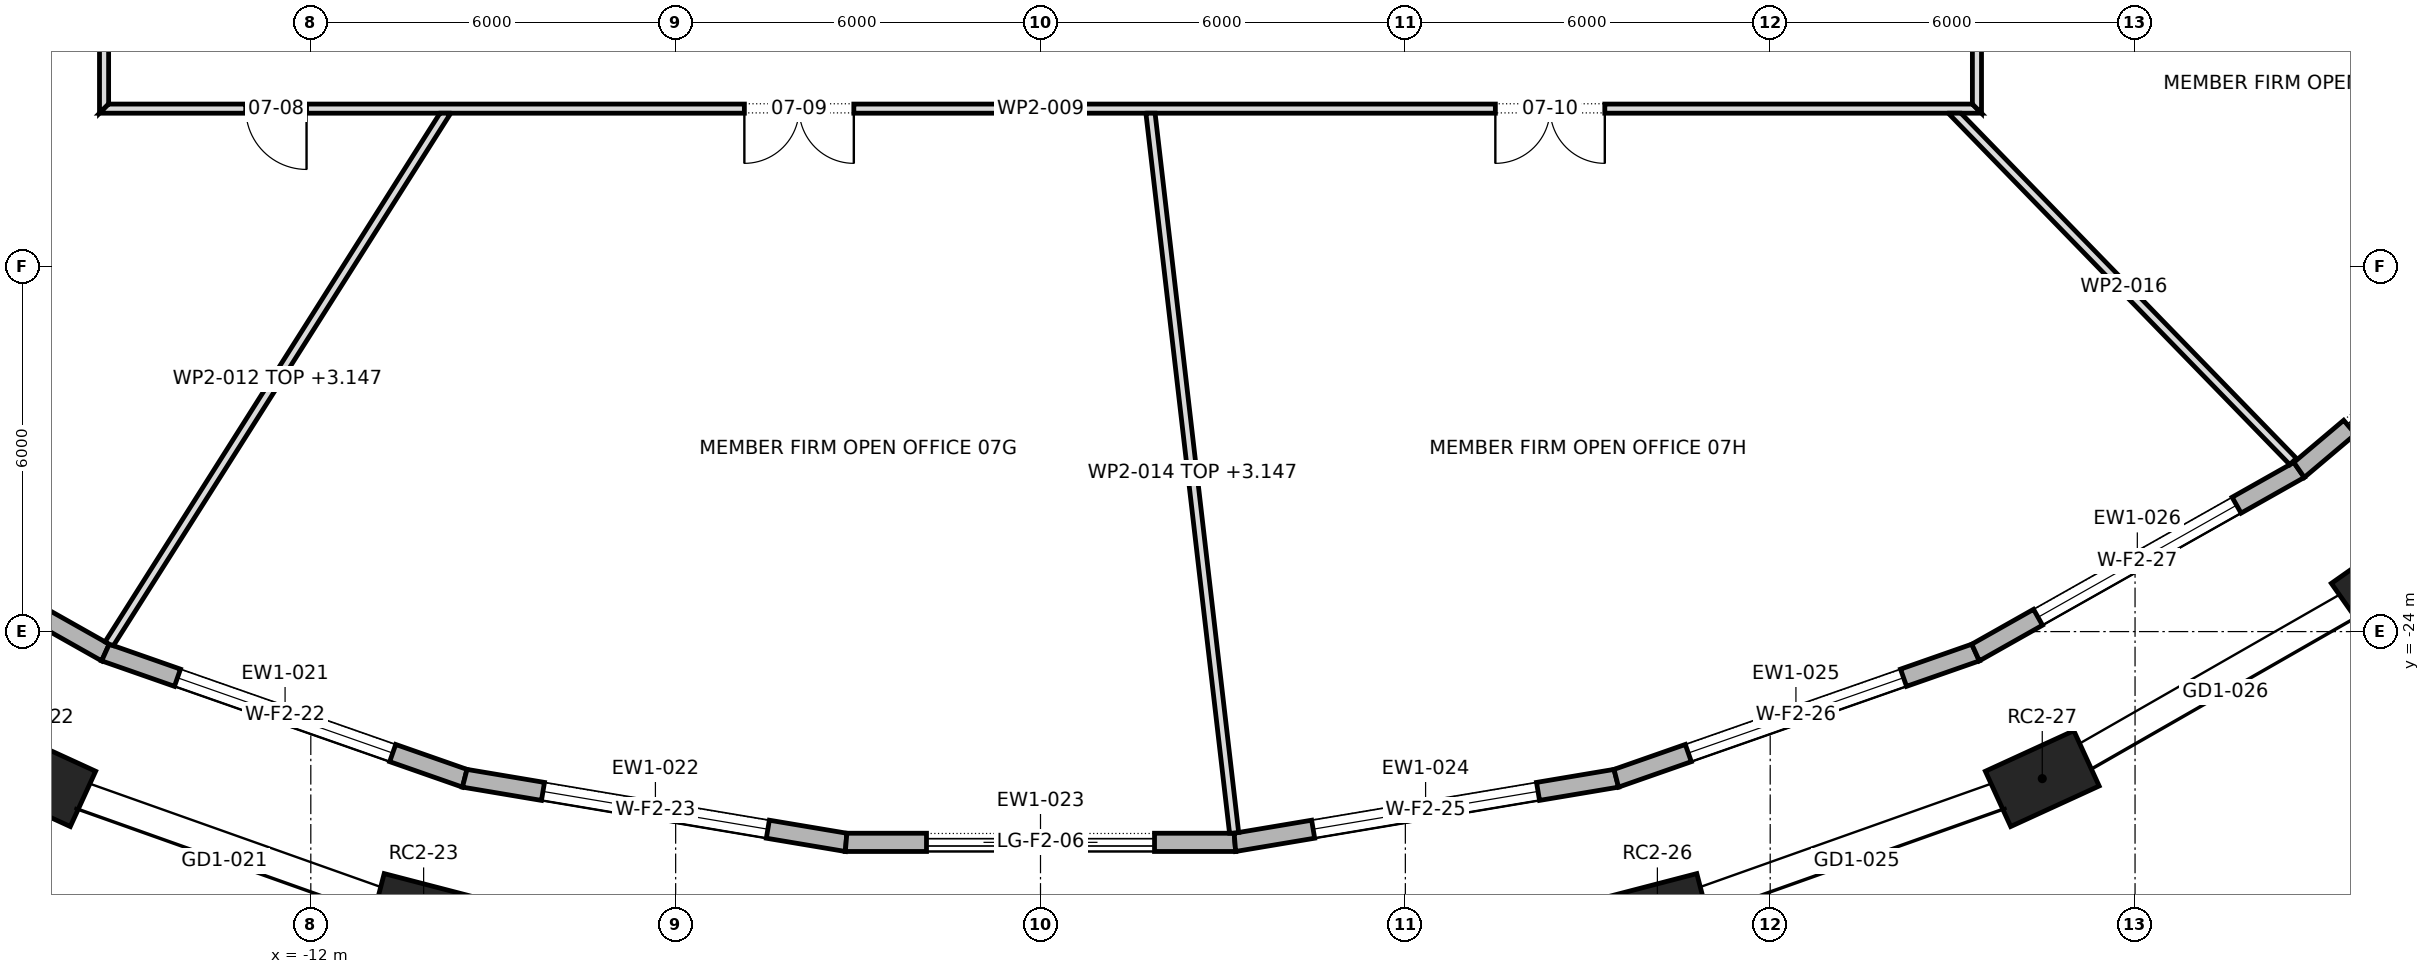
"""IFC4 building model, lengths in metres.
Left out: names, types, materials, properties, quantities, classifications, styles, units other than length and angle.
Written with IfcOpenShell. Run it as: python <this file> out.ifc"""

import sys

from ifc_helpers import new_model, si_unit, direction, frame, frame_2d, origin, origin_2d, place, context, subcontext, project, spatial, polyline, rectangle, outline, extrude, element, fill, save


model = new_model("IFC4")
c1 = context("Model", 3, precision=1e-05, world=origin(), true_north=direction((0.0, 1.0)))
c2 = subcontext(c1, "Body", "Model", "MODEL_VIEW")
j1 = project(units=[si_unit("LENGTHUNIT", "METRE"), si_unit("PLANEANGLEUNIT", "RADIAN")], contexts=[c1])
p1 = place(None, origin())
s1 = spatial("IfcSite", under=j1, at=p1, CompositionType="ELEMENT")
p2 = place(p1, origin())
s2 = spatial("IfcBuilding", under=s1, at=p2, CompositionType="ELEMENT")
p3 = place(p2, frame((0.0, 0.0, 112.9)))
s3 = spatial("IfcBuildingStorey", under=s2, at=p3, CompositionType="ELEMENT", Elevation=112.9)
for number, where, z_axis, x_axis in (
    (1, (-16.474, -26.418, 0.0), (0.0, 0.0, 1.0), (0.909, -0.417, 0.0)),
    (2, (-10.145, -28.665, 0.0), (0.0, 0.0, 1.0), (0.968, -0.252, 0.0)),
    (3, (10.145, -28.665, 0.0), (0.0, 0.0, 1.0), (0.968, 0.252, 0.0)),
    (4, (16.474, -26.418, 0.0), (0.0, 0.0, 1.0), (0.909, 0.417, 0.0)),
    (5, (22.17, -23.156, 0.0), (0.0, 0.0, 1.0), (0.818, 0.575, 0.0)),
):
    element("IfcColumn", number, at=place(p3, frame(where, z_axis=z_axis, x_axis=x_axis)), inside=s3, PredefinedType="COLUMN", context=c2, shape_type="SweptSolid", body=[
        extrude(rectangle(XDim=1.6, YDim=1.0, at=origin_2d()), origin(), (0.0, 0.0, 1.0), 4.2),
    ])
p4 = place(p3, frame((-20.697, -21.341, 0.0), z_axis=(0.0, 0.0, 1.0), x_axis=(0.870828448417, -0.491587035455, 0.0)))
e6 = element("IfcWall", 6, at=p4, inside=s3, PredefinedType="STANDARD", context=c2, shape_type="SweptSolid", body=[
    extrude(outline(polyline([(-0.014, -0.15), (6.122, -0.15), (6.095, 0.15), (0.014, 0.15), (-0.014, -0.15)])), origin(), (0.0, 0.0, 1.0), 3.9),
])
p5 = place(p4, frame((1.179, 0.0, 0.6)))
e7 = element("IfcOpeningElement", 7, at=p5, cuts=e6, PredefinedType="OPENING", context=c2, shape_type="SweptSolid", body=[
    extrude(rectangle(XDim=3.75, YDim=2.85, at=frame_2d((1.875, 1.425))), frame((0.0, 0.162, 0.0), z_axis=(0.0, -1.0, 0.0), x_axis=(1.0, 0.0, 0.0)), (0.0, 0.0, 1.0), 0.324),
])
p6 = place(p3, frame((-15.377, -24.344, 0.0), z_axis=(0.0, 0.0, 1.0), x_axis=(0.943866868202, -0.330326104193, 0.0)))
e8 = element("IfcWall", 8, at=p6, inside=s3, PredefinedType="STANDARD", context=c2, shape_type="SweptSolid", body=[
    extrude(outline(polyline([(-0.013, -0.15), (6.273, -0.15), (6.247, 0.15), (0.013, 0.15), (-0.013, -0.15)])), origin(), (0.0, 0.0, 1.0), 3.9),
])
p7 = place(p6, frame((1.255, 0.0, 0.6)))
e9 = element("IfcOpeningElement", 9, at=p7, cuts=e8, PredefinedType="OPENING", context=c2, shape_type="SweptSolid", body=[
    extrude(rectangle(XDim=3.75, YDim=2.85, at=frame_2d((1.875, 1.425))), frame((0.0, 0.162, 0.0), z_axis=(0.0, -1.0, 0.0), x_axis=(1.0, 0.0, 0.0)), (0.0, 0.0, 1.0), 0.324),
])
p8 = place(p3, frame((-9.469, -26.412, 0.0), z_axis=(0.0, 0.0, 1.0), x_axis=(0.986178310488, -0.165687476666, 0.0)))
e10 = element("IfcWall", 10, at=p8, inside=s3, PredefinedType="STANDARD", context=c2, shape_type="SweptSolid", body=[
    extrude(outline(polyline([(-0.013, -0.15), (6.372, -0.15), (6.347, 0.15), (0.013, 0.15), (-0.013, -0.15)])), origin(), (0.0, 0.0, 1.0), 3.9),
])
p9 = place(p8, frame((1.305, 0.0, 0.6)))
e11 = element("IfcOpeningElement", 11, at=p9, cuts=e10, PredefinedType="OPENING", context=c2, shape_type="SweptSolid", body=[
    extrude(rectangle(XDim=3.75, YDim=2.85, at=frame_2d((1.875, 1.425))), frame((0.0, 0.162, 0.0), z_axis=(0.0, -1.0, 0.0), x_axis=(1.0, 0.0, 0.0)), (0.0, 0.0, 1.0), 0.324),
])
p10 = place(p3, frame((-3.197, -27.466, 0.0), z_axis=(0.0, 0.0, 1.0), x_axis=(1.0, 0.0, 0.0)))
e12 = element("IfcWall", 12, at=p10, inside=s3, PredefinedType="STANDARD", context=c2, shape_type="SweptSolid", body=[
    extrude(outline(polyline([(-0.012, -0.15), (6.406, -0.15), (6.382, 0.15), (0.012, 0.15), (-0.012, -0.15)])), origin(), (0.0, 0.0, 1.0), 3.9),
])
p11 = place(p10, frame((1.322, 0.0, 0.0)))
e13 = element("IfcOpeningElement", 13, at=p11, cuts=e12, PredefinedType="OPENING", context=c2, shape_type="SweptSolid", body=[
    extrude(rectangle(XDim=3.75, YDim=3.45, at=frame_2d((1.875, 1.725))), frame((0.0, 0.162, 0.0), z_axis=(0.0, -1.0, 0.0), x_axis=(1.0, 0.0, 0.0)), (0.0, 0.0, 1.0), 0.324),
])
p12 = place(p3, frame((3.197, -27.466, 0.0), z_axis=(0.0, 0.0, 1.0), x_axis=(0.986178310488, 0.165687476666, 0.0)))
e14 = element("IfcWall", 14, at=p12, inside=s3, PredefinedType="STANDARD", context=c2, shape_type="SweptSolid", body=[
    extrude(outline(polyline([(-0.012, -0.15), (6.372, -0.15), (6.347, 0.15), (0.012, 0.15), (-0.012, -0.15)])), origin(), (0.0, 0.0, 1.0), 3.9),
])
p13 = place(p12, frame((1.305, 0.0, 0.6)))
e15 = element("IfcOpeningElement", 15, at=p13, cuts=e14, PredefinedType="OPENING", context=c2, shape_type="SweptSolid", body=[
    extrude(rectangle(XDim=3.75, YDim=2.85, at=frame_2d((1.875, 1.425))), frame((0.0, 0.162, 0.0), z_axis=(0.0, -1.0, 0.0), x_axis=(1.0, 0.0, 0.0)), (0.0, 0.0, 1.0), 0.324),
])
p14 = place(p3, frame((9.469, -26.412, 0.0), z_axis=(0.0, 0.0, 1.0), x_axis=(0.943866868202, 0.330326104193, 0.0)))
e16 = element("IfcWall", 16, at=p14, inside=s3, PredefinedType="STANDARD", context=c2, shape_type="SweptSolid", body=[
    extrude(outline(polyline([(-0.013, -0.15), (6.273, -0.15), (6.247, 0.15), (0.013, 0.15), (-0.013, -0.15)])), origin(), (0.0, 0.0, 1.0), 3.9),
])
p15 = place(p14, frame((1.255, 0.0, 0.6)))
e17 = element("IfcOpeningElement", 17, at=p15, cuts=e16, PredefinedType="OPENING", context=c2, shape_type="SweptSolid", body=[
    extrude(rectangle(XDim=3.75, YDim=2.85, at=frame_2d((1.875, 1.425))), frame((0.0, 0.162, 0.0), z_axis=(0.0, -1.0, 0.0), x_axis=(1.0, 0.0, 0.0)), (0.0, 0.0, 1.0), 0.324),
])
p16 = place(p3, frame((15.377, -24.344, 0.0), z_axis=(0.0, 0.0, 1.0), x_axis=(0.870828448417, 0.491587035455, 0.0)))
e18 = element("IfcWall", 18, at=p16, inside=s3, PredefinedType="STANDARD", context=c2, shape_type="SweptSolid", body=[
    extrude(outline(polyline([(-0.013, -0.15), (6.123, -0.15), (6.094, 0.15), (0.013, 0.15), (-0.013, -0.15)])), origin(), (0.0, 0.0, 1.0), 3.9),
])
p17 = place(p16, frame((1.179, 0.0, 0.6)))
e19 = element("IfcOpeningElement", 19, at=p17, cuts=e18, PredefinedType="OPENING", context=c2, shape_type="SweptSolid", body=[
    extrude(rectangle(XDim=3.75, YDim=2.85, at=frame_2d((1.875, 1.425))), frame((0.0, 0.162, 0.0), z_axis=(0.0, -1.0, 0.0), x_axis=(1.0, 0.0, 0.0)), (0.0, 0.0, 1.0), 0.324),
])
p18 = place(p3, frame((20.697, -21.341, 0.0), z_axis=(0.0, 0.0, 1.0), x_axis=(0.763894031266, 0.645341699409, 0.0)))
e20 = element("IfcWall", 20, at=p18, inside=s3, PredefinedType="STANDARD", context=c2, shape_type="SweptSolid", body=[
    extrude(outline(polyline([(-0.014, -0.15), (5.94, -0.15), (5.91, 0.15), (0.014, 0.15), (-0.014, -0.15)])), origin(), (0.0, 0.0, 1.0), 3.9),
])
p19 = place(p18, frame((1.087, 0.0, 0.0)))
e21 = element("IfcOpeningElement", 21, at=p19, cuts=e20, PredefinedType="OPENING", context=c2, shape_type="SweptSolid", body=[
    extrude(rectangle(XDim=3.75, YDim=3.45, at=frame_2d((1.875, 1.725))), frame((0.0, 0.162, 0.0), z_axis=(0.0, -1.0, 0.0), x_axis=(1.0, 0.0, 0.0)), (0.0, 0.0, 1.0), 0.324),
])
p20 = place(p3, frame((-25.12, -17.414, 0.0), z_axis=(0.0, 0.0, 1.0), x_axis=(0.822008683907, 0.569474954306, 0.0)))
e22 = element("IfcWall", 22, at=p20, inside=s3, PredefinedType="PARTITIONING", context=c2, shape_type="SweptSolid", body=[
    extrude(outline(polyline([(0.024, -0.075), (1.967, -0.075), (3.91, -0.075), (5.853, -0.075), (7.796, -0.075), (9.739, -0.075), (11.681, -0.075), (11.734, 0.002), (11.734, 0.002), (11.785, 0.074), (11.785, 0.075), (10.15, 0.075), (8.516, 0.075), (6.881, 0.075), (5.246, 0.075), (5.245, 0.072), (5.241, 0.075), (3.494, 0.075), (1.747, 0.075), (0.0, 0.075), (0.0, 0.07), (0.005, -0.002), (0.024, -0.075)])), origin(), (0.0, 0.0, 1.0), 3.147),
])
p21 = place(p3, frame((-15.4, -15.475, 0.0), z_axis=(0.0, 0.0, 1.0), x_axis=(0.0, 1.0, 0.0)))
e23 = element("IfcWall", 23, at=p21, inside=s3, PredefinedType="PARTITIONING", context=c2, shape_type="SweptSolid", body=[
    extrude(outline(polyline([(0.15, -0.075), (2.066, -0.075), (3.981, -0.075), (5.897, -0.075), (7.812, -0.075), (9.728, -0.075), (11.644, -0.075), (13.56, -0.075), (15.475, -0.075), (17.391, -0.075), (19.306, -0.075), (21.222, -0.075), (23.138, -0.075), (25.053, -0.075), (26.969, -0.075), (28.885, -0.075), (30.8, -0.075), (30.95, 0.075), (29.016, 0.075), (27.081, 0.075), (25.147, 0.075), (23.212, 0.075), (21.278, 0.075), (19.344, 0.075), (17.409, 0.075), (15.475, 0.075), (13.541, 0.075), (11.606, 0.075), (9.672, 0.075), (7.738, 0.075), (5.803, 0.075), (3.869, 0.075), (1.935, 0.075), (0.0, 0.075), (0.15, -0.075)])), origin(), (0.0, 0.0, 1.0), 3.9),
])
p22 = place(p21, frame((24.25, 0.0, 0.0)))
e24 = element("IfcOpeningElement", 24, at=p22, cuts=e23, PredefinedType="OPENING", context=c2, shape_type="SweptSolid", body=[
    extrude(rectangle(XDim=1.8, YDim=2.1, at=frame_2d((0.9, 1.05))), frame((0.0, 0.087, 0.0), z_axis=(0.0, -1.0, 0.0), x_axis=(1.0, 0.0, 0.0)), (0.0, 0.0, 1.0), 0.174),
])
p23 = place(p21, frame((6.735, 0.0, 0.0)))
e25 = element("IfcOpeningElement", 25, at=p23, cuts=e23, PredefinedType="OPENING", context=c2, shape_type="SweptSolid", body=[
    extrude(rectangle(XDim=1.0, YDim=2.1, at=frame_2d((0.5, 1.05))), frame((0.0, 0.087, 0.0), z_axis=(0.0, -1.0, 0.0), x_axis=(1.0, 0.0, 0.0)), (0.0, 0.0, 1.0), 0.174),
])
p24 = place(p21, frame((12.5, 0.0, 0.0)))
e26 = element("IfcOpeningElement", 26, at=p24, cuts=e23, PredefinedType="OPENING", context=c2, shape_type="SweptSolid", body=[
    extrude(rectangle(XDim=1.0, YDim=2.1, at=frame_2d((0.5, 1.05))), frame((0.0, 0.087, 0.0), z_axis=(0.0, -1.0, 0.0), x_axis=(1.0, 0.0, 0.0)), (0.0, 0.0, 1.0), 0.174),
])
p25 = place(p21, frame((17.375, 0.0, 0.0)))
e27 = element("IfcOpeningElement", 27, at=p25, cuts=e23, PredefinedType="OPENING", context=c2, shape_type="SweptSolid", body=[
    extrude(rectangle(XDim=1.0, YDim=2.1, at=frame_2d((0.5, 1.05))), frame((0.0, 0.087, 0.0), z_axis=(0.0, -1.0, 0.0), x_axis=(1.0, 0.0, 0.0)), (0.0, 0.0, 1.0), 0.174),
])
p26 = place(p3, frame((-15.475, -15.4, 0.0), z_axis=(0.0, 0.0, 1.0), x_axis=(1.0, 0.0, 0.0)))
e28 = element("IfcWall", 28, at=p26, inside=s3, PredefinedType="PARTITIONING", context=c2, shape_type="SweptSolid", body=[
    extrude(outline(polyline([(0.0, -0.075), (1.935, -0.075), (3.869, -0.075), (5.803, -0.075), (7.738, -0.075), (9.672, -0.075), (11.606, -0.075), (13.541, -0.075), (15.475, -0.075), (17.409, -0.075), (19.344, -0.075), (21.278, -0.075), (23.212, -0.075), (25.147, -0.075), (27.081, -0.075), (29.016, -0.075), (30.95, -0.075), (30.8, 0.075), (28.885, 0.075), (26.969, 0.075), (25.053, 0.075), (23.138, 0.075), (21.222, 0.075), (19.306, 0.075), (17.391, 0.075), (15.475, 0.075), (13.56, 0.075), (11.644, 0.075), (9.728, 0.075), (7.812, 0.075), (5.897, 0.075), (3.981, 0.075), (2.066, 0.075), (0.15, 0.075), (0.0, -0.075)])), origin(), (0.0, 0.0, 1.0), 3.9),
])
p27 = place(p26, frame((2.405, 0.0, 0.0)))
e29 = element("IfcOpeningElement", 29, at=p27, cuts=e28, PredefinedType="OPENING", context=c2, shape_type="SweptSolid", body=[
    extrude(rectangle(XDim=1.0, YDim=2.1, at=frame_2d((0.5, 1.05))), frame((0.0, 0.087, 0.0), z_axis=(0.0, -1.0, 0.0), x_axis=(1.0, 0.0, 0.0)), (0.0, 0.0, 1.0), 0.174),
])
p28 = place(p26, frame((10.605, 0.0, 0.0)))
e30 = element("IfcOpeningElement", 30, at=p28, cuts=e28, PredefinedType="OPENING", context=c2, shape_type="SweptSolid", body=[
    extrude(rectangle(XDim=1.8, YDim=2.1, at=frame_2d((0.9, 1.05))), frame((0.0, 0.087, 0.0), z_axis=(0.0, -1.0, 0.0), x_axis=(1.0, 0.0, 0.0)), (0.0, 0.0, 1.0), 0.174),
])
p29 = place(p26, frame((22.955, 0.0, 0.0)))
e31 = element("IfcOpeningElement", 31, at=p29, cuts=e28, PredefinedType="OPENING", context=c2, shape_type="SweptSolid", body=[
    extrude(rectangle(XDim=1.8, YDim=2.1, at=frame_2d((0.9, 1.05))), frame((0.0, 0.087, 0.0), z_axis=(0.0, -1.0, 0.0), x_axis=(1.0, 0.0, 0.0)), (0.0, 0.0, 1.0), 0.174),
])
p30 = place(p3, frame((-9.762, -15.435, 0.0), z_axis=(0.0, 0.0, 1.0), x_axis=(-0.535189090909, -0.844732287161, 0.0)))
e32 = element("IfcWall", 32, at=p30, inside=s3, PredefinedType="PARTITIONING", context=c2, shape_type="SweptSolid", body=[
    extrude(outline(polyline([(10.386, -0.075), (10.386, -0.069), (10.382, 0.004), (10.365, 0.075), (8.638, 0.075), (6.91, 0.075), (5.183, 0.075), (3.455, 0.075), (1.728, 0.075), (0.0, 0.075), (0.0, 0.075), (0.095, -0.075), (1.81, -0.075), (3.525, -0.075), (5.24, -0.075), (6.955, -0.075), (8.671, -0.075), (10.386, -0.075)])), origin(), (0.0, 0.0, 1.0), 3.147),
])
p31 = place(p3, frame((1.808, -15.467, 0.0), z_axis=(0.0, 0.0, 1.0), x_axis=(0.115425226741, -0.993316171736, 0.0)))
e33 = element("IfcWall", 33, at=p31, inside=s3, PredefinedType="PARTITIONING", context=c2, shape_type="SweptSolid", body=[
    extrude(outline(polyline([(0.0, -0.075), (1.987, -0.075), (3.973, -0.075), (5.96, -0.075), (7.947, -0.075), (9.934, -0.075), (11.92, -0.075), (11.925, -0.035), (11.925, 0.075), (9.94, 0.075), (7.956, 0.075), (5.971, 0.075), (3.987, 0.075), (2.002, 0.075), (0.017, 0.075), (0.0, -0.073), (0.0, -0.075)])), origin(), (0.0, 0.0, 1.0), 3.147),
])
p32 = place(p3, frame((14.982, -15.423, 0.0), z_axis=(0.0, 0.0, 1.0), x_axis=(0.696915710248, -0.717153046992, 0.0)))
e34 = element("IfcWall", 34, at=p32, inside=s3, PredefinedType="PARTITIONING", context=c2, shape_type="SweptSolid", body=[
    extrude(outline(polyline([(8.059, 0.075), (6.08, 0.075), (4.102, 0.075), (2.124, 0.075), (0.146, 0.075), (0.0, -0.075), (0.0, -0.075), (1.612, -0.075), (3.223, -0.075), (4.835, -0.075), (6.447, -0.075), (8.059, -0.075), (8.059, 0.075)])), origin(), (0.0, 0.0, 1.0), 3.9),
])
p33 = place(p3, frame((15.4, -15.475, 0.0), z_axis=(0.0, 0.0, 1.0), x_axis=(0.0, 1.0, 0.0)))
e35 = element("IfcWall", 35, at=p33, inside=s3, PredefinedType="PARTITIONING", context=c2, shape_type="SweptSolid", body=[
    extrude(outline(polyline([(14.195, 0.075), (12.439, 0.075), (10.684, 0.075), (8.928, 0.075), (7.173, 0.075), (5.417, 0.075), (3.661, 0.075), (1.906, 0.075), (0.15, 0.075), (0.0, -0.075), (1.775, -0.075), (3.549, -0.075), (5.323, -0.075), (7.098, -0.075), (8.872, -0.075), (10.646, -0.075), (12.421, -0.075), (14.195, -0.075), (14.195, 0.075)])), origin(), (0.0, 0.0, 1.0), 3.9),
])
p34 = place(p33, frame((3.8, 0.0, 0.0)))
e36 = element("IfcOpeningElement", 36, at=p34, cuts=e35, PredefinedType="OPENING", context=c2, shape_type="SweptSolid", body=[
    extrude(rectangle(XDim=1.0, YDim=2.1, at=frame_2d((0.5, 1.05))), frame((0.0, 0.087, 0.0), z_axis=(0.0, -1.0, 0.0), x_axis=(1.0, 0.0, 0.0)), (0.0, 0.0, 1.0), 0.174),
])
p35 = place(p33, frame((10.86, 0.0, 0.0)))
e37 = element("IfcOpeningElement", 37, at=p35, cuts=e35, PredefinedType="OPENING", context=c2, shape_type="SweptSolid", body=[
    extrude(rectangle(XDim=1.0, YDim=2.1, at=frame_2d((0.5, 1.05))), frame((0.0, 0.087, 0.0), z_axis=(0.0, -1.0, 0.0), x_axis=(1.0, 0.0, 0.0)), (0.0, 0.0, 1.0), 0.174),
])
p36 = place(p7, origin())
e38 = element("IfcWindow", 38, at=p36, inside=s3, PartitioningType="TRIPLE_PANEL_VERTICAL", PredefinedType="WINDOW", context=c2, shape_type="SweptSolid", body=[
    extrude(rectangle(XDim=3.75, YDim=2.85, at=frame_2d((1.875, 1.425))), frame((0.0, 0.03, 0.0), z_axis=(0.0, -1.0, 0.0), x_axis=(1.0, 0.0, 0.0)), (0.0, 0.0, 1.0), 0.06),
])
fill(e9, e38)
p37 = place(p9, origin())
e39 = element("IfcWindow", 39, at=p37, inside=s3, PartitioningType="TRIPLE_PANEL_VERTICAL", PredefinedType="WINDOW", context=c2, shape_type="SweptSolid", body=[
    extrude(rectangle(XDim=3.75, YDim=2.85, at=frame_2d((1.875, 1.425))), frame((0.0, 0.03, 0.0), z_axis=(0.0, -1.0, 0.0), x_axis=(1.0, 0.0, 0.0)), (0.0, 0.0, 1.0), 0.06),
])
fill(e11, e39)
p38 = place(p11, origin())
e40 = element("IfcDoor", 40, at=p38, inside=s3, OperationType="DOUBLE_DOOR_SLIDING", PredefinedType="DOOR", context=c2, shape_type="SweptSolid", body=[
    extrude(rectangle(XDim=3.75, YDim=3.45, at=frame_2d((1.875, 1.725))), frame((0.0, 0.025, 0.0), z_axis=(0.0, -1.0, 0.0), x_axis=(1.0, 0.0, 0.0)), (0.0, 0.0, 1.0), 0.05),
])
fill(e13, e40)
p39 = place(p13, origin())
e41 = element("IfcWindow", 41, at=p39, inside=s3, PartitioningType="TRIPLE_PANEL_VERTICAL", PredefinedType="WINDOW", context=c2, shape_type="SweptSolid", body=[
    extrude(rectangle(XDim=3.75, YDim=2.85, at=frame_2d((1.875, 1.425))), frame((0.0, 0.03, 0.0), z_axis=(0.0, -1.0, 0.0), x_axis=(1.0, 0.0, 0.0)), (0.0, 0.0, 1.0), 0.06),
])
fill(e15, e41)
p40 = place(p15, origin())
e42 = element("IfcWindow", 42, at=p40, inside=s3, PartitioningType="TRIPLE_PANEL_VERTICAL", PredefinedType="WINDOW", context=c2, shape_type="SweptSolid", body=[
    extrude(rectangle(XDim=3.75, YDim=2.85, at=frame_2d((1.875, 1.425))), frame((0.0, 0.03, 0.0), z_axis=(0.0, -1.0, 0.0), x_axis=(1.0, 0.0, 0.0)), (0.0, 0.0, 1.0), 0.06),
])
fill(e17, e42)
p41 = place(p17, origin())
e43 = element("IfcWindow", 43, at=p41, inside=s3, PartitioningType="TRIPLE_PANEL_VERTICAL", PredefinedType="WINDOW", context=c2, shape_type="SweptSolid", body=[
    extrude(rectangle(XDim=3.75, YDim=2.85, at=frame_2d((1.875, 1.425))), frame((0.0, 0.03, 0.0), z_axis=(0.0, -1.0, 0.0), x_axis=(1.0, 0.0, 0.0)), (0.0, 0.0, 1.0), 0.06),
])
fill(e19, e43)
p42 = place(p19, origin())
e44 = element("IfcDoor", 44, at=p42, inside=s3, OperationType="DOUBLE_DOOR_SLIDING", PredefinedType="DOOR", context=c2, shape_type="SweptSolid", body=[
    extrude(rectangle(XDim=3.75, YDim=3.45, at=frame_2d((1.875, 1.725))), frame((0.0, 0.025, 0.0), z_axis=(0.0, -1.0, 0.0), x_axis=(1.0, 0.0, 0.0)), (0.0, 0.0, 1.0), 0.05),
])
fill(e21, e44)
p43 = place(p27, frame((1.0, 0.0, 0.0), z_axis=(0.0, 0.0, 1.0), x_axis=(-1.0, 0.0, 0.0)))
e45 = element("IfcDoor", 45, at=p43, inside=s3, OperationType="SINGLE_SWING_RIGHT", PredefinedType="DOOR", context=c2, shape_type="SweptSolid", body=[
    extrude(rectangle(XDim=1.0, YDim=2.1, at=frame_2d((0.5, 1.05))), frame((0.0, 0.025, 0.0), z_axis=(0.0, -1.0, 0.0), x_axis=(1.0, 0.0, 0.0)), (0.0, 0.0, 1.0), 0.05),
])
fill(e29, e45)
p44 = place(p28, frame((1.8, 0.0, 0.0), z_axis=(0.0, 0.0, 1.0), x_axis=(-1.0, 0.0, 0.0)))
e46 = element("IfcDoor", 46, at=p44, inside=s3, OperationType="DOUBLE_DOOR_SINGLE_SWING", PredefinedType="DOOR", context=c2, shape_type="SweptSolid", body=[
    extrude(rectangle(XDim=1.8, YDim=2.1, at=frame_2d((0.9, 1.05))), frame((0.0, 0.025, 0.0), z_axis=(0.0, -1.0, 0.0), x_axis=(1.0, 0.0, 0.0)), (0.0, 0.0, 1.0), 0.05),
])
fill(e30, e46)
p45 = place(p29, frame((1.8, 0.0, 0.0), z_axis=(0.0, 0.0, 1.0), x_axis=(-1.0, 0.0, 0.0)))
e47 = element("IfcDoor", 47, at=p45, inside=s3, OperationType="DOUBLE_DOOR_SINGLE_SWING", PredefinedType="DOOR", context=c2, shape_type="SweptSolid", body=[
    extrude(rectangle(XDim=1.8, YDim=2.1, at=frame_2d((0.9, 1.05))), frame((0.0, 0.025, 0.0), z_axis=(0.0, -1.0, 0.0), x_axis=(1.0, 0.0, 0.0)), (0.0, 0.0, 1.0), 0.05),
])
fill(e31, e47)
save(model, sys.argv[1])
